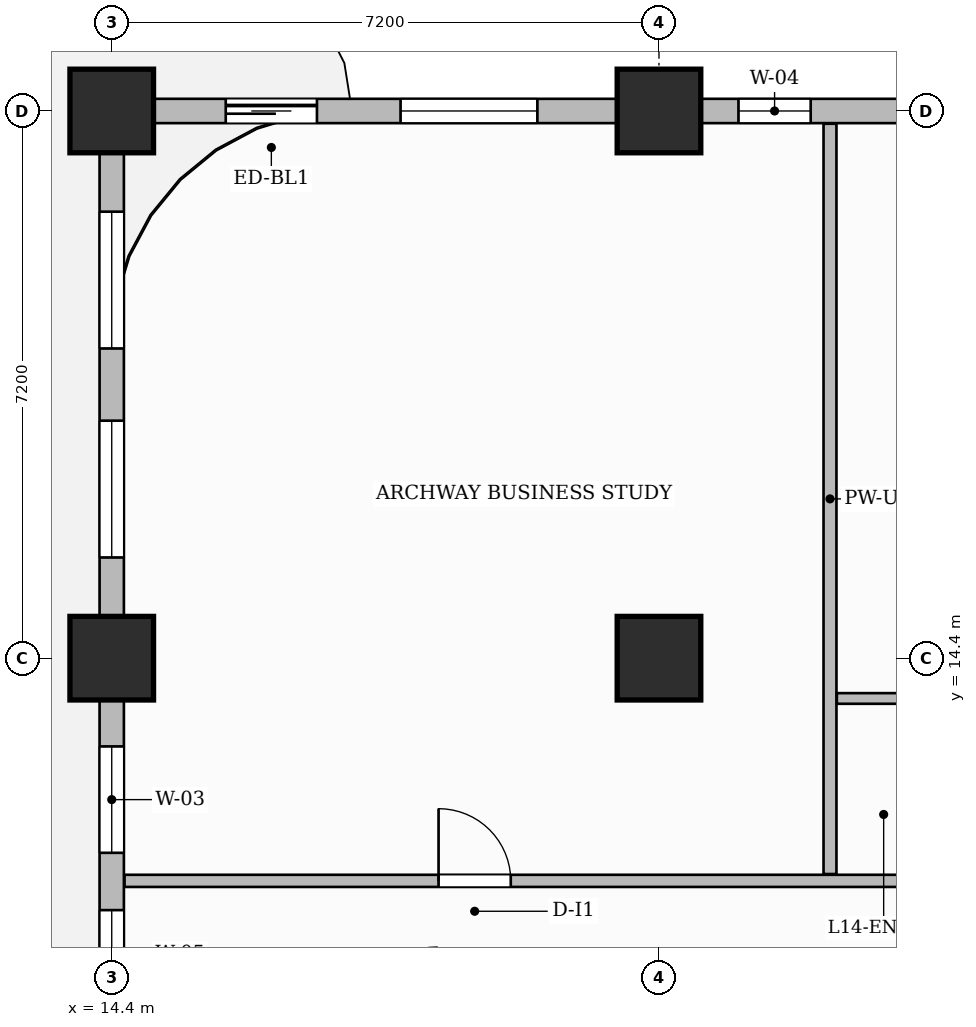
"""IFC4 building model, lengths in metres.
Left out: names, types, materials, properties, quantities, classifications, styles, units other than length and angle.
Written with IfcOpenShell. Run it as: python <this file> out.ifc"""

import sys

from ifc_helpers import new_model, si_unit, direction, frame, frame_2d, origin, origin_2d, place, context, subcontext, project, spatial, rectangle, extrude, source, transform, mapped, element, fill, save


model = new_model("IFC4")
c1 = context("Model", 3, precision=1e-05, world=origin(), true_north=direction((0.0, 1.0)))
c2 = subcontext(c1, "Body", "Model", "MODEL_VIEW")
j1 = project(units=[si_unit("LENGTHUNIT", "METRE"), si_unit("PLANEANGLEUNIT", "RADIAN")], contexts=[c1])
p1 = place(None, origin())
s1 = spatial("IfcSite", under=j1, at=p1, CompositionType="ELEMENT")
p2 = place(p1, origin())
s2 = spatial("IfcBuilding", under=s1, at=p2, CompositionType="ELEMENT")
p3 = place(p2, frame((0.0, 0.0, 62.0)))
s3 = spatial("IfcBuildingStorey", under=s2, at=p3, CompositionType="ELEMENT", Elevation=62.0)
m1 = source(origin(), c2, "Body", "SweptSolid", [
    extrude(rectangle(XDim=1.1, YDim=1.1, at=origin_2d()), origin(), (0.0, 0.0, 1.0), 3.7),
])
for number, where, z_axis, x_axis in (
    (1, (14.4, 14.4, 0.0), (0.0, 0.0, 1.0), (1.0, 0.0, 0.0)),
    (2, (14.4, 21.6, 0.0), (0.0, 0.0, 1.0), (1.0, 0.0, 0.0)),
    (3, (21.6, 14.4, 0.0), (0.0, 0.0, 1.0), (1.0, 0.0, 0.0)),
    (4, (21.6, 21.6, 0.0), (0.0, 0.0, 1.0), (1.0, 0.0, 0.0)),
):
    element("IfcColumn", number, at=place(p3, frame(where, z_axis=z_axis, x_axis=x_axis)), inside=s3, PredefinedType="COLUMN", context=c2, shape_type="MappedRepresentation", body=[
        mapped(m1, transform((0.0, 0.0, 0.0), scale=1.0)),
    ])
p4 = place(p3, frame((14.568, 11.47, 0.0), z_axis=(0.0, 0.0, 1.0), x_axis=(1.0, 0.0, 0.0)))
e5 = element("IfcWall", 5, at=p4, inside=s3, PredefinedType="PARTITIONING", context=c2, shape_type="SweptSolid", body=[
    extrude(rectangle(XDim=15.542, YDim=0.16, at=frame_2d((7.771, 0.0))), origin(), (0.0, 0.0, 1.0), 3.45),
])
p5 = place(p4, frame((4.132, 0.0, 0.0)))
e6 = element("IfcOpeningElement", 6, at=p5, cuts=e5, PredefinedType="OPENING", context=c2, shape_type="SweptSolid", body=[
    extrude(rectangle(XDim=0.95, YDim=2.15, at=frame_2d((0.475, 1.075))), frame((0.0, 0.09, 0.0), z_axis=(0.0, -1.0, 0.0), x_axis=(1.0, 0.0, 0.0)), (0.0, 0.0, 1.0), 0.18),
])
p6 = place(p4, frame((13.107, 0.0, 0.0)))
e7 = element("IfcOpeningElement", 7, at=p6, cuts=e5, PredefinedType="OPENING", context=c2, shape_type="SweptSolid", body=[
    extrude(rectangle(XDim=1.0, YDim=2.2, at=frame_2d((0.5, 1.1))), frame((0.0, 0.09, 0.0), z_axis=(0.0, -1.0, 0.0), x_axis=(1.0, 0.0, 0.0)), (0.0, 0.0, 1.0), 0.18),
])
p7 = place(p3, frame((23.85, 11.56, 0.0), z_axis=(0.0, 0.0, 1.0), x_axis=(0.0, 1.0, 0.0)))
e8 = element("IfcWall", 8, at=p7, inside=s3, PredefinedType="PARTITIONING", context=c2, shape_type="SweptSolid", body=[
    extrude(rectangle(XDim=9.872, YDim=0.17, at=frame_2d((4.936, 0.0))), origin(), (0.0, 0.0, 1.0), 3.45),
])
p8 = place(p3, frame((23.94, 13.87, 0.0), z_axis=(0.0, 0.0, 1.0), x_axis=(1.0, 0.0, 0.0)))
e9 = element("IfcWall", 9, at=p8, inside=s3, PredefinedType="PARTITIONING", context=c2, shape_type="SweptSolid", body=[
    extrude(rectangle(XDim=2.12, YDim=0.14, at=frame_2d((1.06, 0.0))), origin(), (0.0, 0.0, 1.0), 3.45),
])
p9 = place(p3, frame((14.4, 21.6, 0.0), z_axis=(0.0, 0.0, 1.0), x_axis=(1.0, 0.0, 0.0)))
e10 = element("IfcWall", 10, at=p9, inside=s3, PredefinedType="SOLIDWALL", context=c2, shape_type="SweptSolid", body=[
    extrude(rectangle(XDim=43.2, YDim=0.32, at=frame_2d((21.6, 0.0))), origin(), (0.0, 0.0, 1.0), 2.885),
])
p10 = place(p9, frame((1.5, 0.0, 0.0)))
e11 = element("IfcOpeningElement", 11, at=p10, cuts=e10, PredefinedType="OPENING", context=c2, shape_type="SweptSolid", body=[
    extrude(rectangle(XDim=1.2, YDim=2.2, at=frame_2d((0.6, 1.1))), frame((0.0, 0.17, 0.0), z_axis=(0.0, -1.0, 0.0), x_axis=(1.0, 0.0, 0.0)), (0.0, 0.0, 1.0), 0.34),
])
p11 = place(p9, frame((3.8, 0.0, 0.8)))
e12 = element("IfcOpeningElement", 12, at=p11, cuts=e10, PredefinedType="OPENING", context=c2, shape_type="SweptSolid", body=[
    extrude(rectangle(XDim=1.8, YDim=1.85, at=frame_2d((0.9, 0.925))), frame((0.0, 0.17, 0.0), z_axis=(0.0, -1.0, 0.0), x_axis=(1.0, 0.0, 0.0)), (0.0, 0.0, 1.0), 0.34),
])
p12 = place(p9, frame((8.246, 0.0, 0.8)))
e13 = element("IfcOpeningElement", 13, at=p12, cuts=e10, PredefinedType="OPENING", context=c2, shape_type="SweptSolid", body=[
    extrude(rectangle(XDim=0.95, YDim=1.75, at=frame_2d((0.475, 0.875))), frame((0.0, 0.17, 0.0), z_axis=(0.0, -1.0, 0.0), x_axis=(1.0, 0.0, 0.0)), (0.0, 0.0, 1.0), 0.34),
])
p13 = place(p9, frame((10.629, 0.0, 0.8)))
e14 = element("IfcOpeningElement", 14, at=p13, cuts=e10, PredefinedType="OPENING", context=c2, shape_type="SweptSolid", body=[
    extrude(rectangle(XDim=1.8, YDim=1.85, at=frame_2d((0.9, 0.925))), frame((0.0, 0.17, 0.0), z_axis=(0.0, -1.0, 0.0), x_axis=(1.0, 0.0, 0.0)), (0.0, 0.0, 1.0), 0.34),
])
p14 = place(p9, frame((16.701, 0.0, 0.8)))
e15 = element("IfcOpeningElement", 15, at=p14, cuts=e10, PredefinedType="OPENING", context=c2, shape_type="SweptSolid", body=[
    extrude(rectangle(XDim=1.8, YDim=1.85, at=frame_2d((0.9, 0.925))), frame((0.0, 0.17, 0.0), z_axis=(0.0, -1.0, 0.0), x_axis=(1.0, 0.0, 0.0)), (0.0, 0.0, 1.0), 0.34),
])
p15 = place(p9, frame((21.725, 0.0, 0.8)))
e16 = element("IfcOpeningElement", 16, at=p15, cuts=e10, PredefinedType="OPENING", context=c2, shape_type="SweptSolid", body=[
    extrude(rectangle(XDim=1.8, YDim=1.85, at=frame_2d((0.9, 0.925))), frame((0.0, 0.17, 0.0), z_axis=(0.0, -1.0, 0.0), x_axis=(1.0, 0.0, 0.0)), (0.0, 0.0, 1.0), 0.34),
])
p16 = place(p9, frame((24.475, 0.0, 0.8)))
e17 = element("IfcOpeningElement", 17, at=p16, cuts=e10, PredefinedType="OPENING", context=c2, shape_type="SweptSolid", body=[
    extrude(rectangle(XDim=1.8, YDim=1.85, at=frame_2d((0.9, 0.925))), frame((0.0, 0.17, 0.0), z_axis=(0.0, -1.0, 0.0), x_axis=(1.0, 0.0, 0.0)), (0.0, 0.0, 1.0), 0.34),
])
p17 = place(p9, frame((29.075, 0.0, 0.8)))
e18 = element("IfcOpeningElement", 18, at=p17, cuts=e10, PredefinedType="OPENING", context=c2, shape_type="SweptSolid", body=[
    extrude(rectangle(XDim=1.8, YDim=1.85, at=frame_2d((0.9, 0.925))), frame((0.0, 0.17, 0.0), z_axis=(0.0, -1.0, 0.0), x_axis=(1.0, 0.0, 0.0)), (0.0, 0.0, 1.0), 0.34),
])
p18 = place(p9, frame((32.125, 0.0, 0.8)))
e19 = element("IfcOpeningElement", 19, at=p18, cuts=e10, PredefinedType="OPENING", context=c2, shape_type="SweptSolid", body=[
    extrude(rectangle(XDim=1.8, YDim=1.85, at=frame_2d((0.9, 0.925))), frame((0.0, 0.17, 0.0), z_axis=(0.0, -1.0, 0.0), x_axis=(1.0, 0.0, 0.0)), (0.0, 0.0, 1.0), 0.34),
])
p19 = place(p9, frame((36.875, 0.0, 0.8)))
e20 = element("IfcOpeningElement", 20, at=p19, cuts=e10, PredefinedType="OPENING", context=c2, shape_type="SweptSolid", body=[
    extrude(rectangle(XDim=1.8, YDim=1.85, at=frame_2d((0.9, 0.925))), frame((0.0, 0.17, 0.0), z_axis=(0.0, -1.0, 0.0), x_axis=(1.0, 0.0, 0.0)), (0.0, 0.0, 1.0), 0.34),
])
p20 = place(p9, frame((39.925, 0.0, 0.8)))
e21 = element("IfcOpeningElement", 21, at=p20, cuts=e10, PredefinedType="OPENING", context=c2, shape_type="SweptSolid", body=[
    extrude(rectangle(XDim=1.8, YDim=1.85, at=frame_2d((0.9, 0.925))), frame((0.0, 0.17, 0.0), z_axis=(0.0, -1.0, 0.0), x_axis=(1.0, 0.0, 0.0)), (0.0, 0.0, 1.0), 0.34),
])
p21 = place(p3, frame((14.4, 0.05, 0.0), z_axis=(0.0, 0.0, 1.0), x_axis=(0.0, 1.0, 0.0)))
e22 = element("IfcWall", 22, at=p21, inside=s3, PredefinedType="SOLIDWALL", context=c2, shape_type="SweptSolid", body=[
    extrude(rectangle(XDim=21.5, YDim=0.32, at=frame_2d((10.75, 0.0))), origin(), (0.0, 0.0, 1.0), 2.885),
])
p22 = place(p21, frame((1.721, 0.0, 0.8)))
e23 = element("IfcOpeningElement", 23, at=p22, cuts=e22, PredefinedType="OPENING", context=c2, shape_type="SweptSolid", body=[
    extrude(rectangle(XDim=1.8, YDim=1.85, at=frame_2d((0.9, 0.925))), frame((0.0, 0.17, 0.0), z_axis=(0.0, -1.0, 0.0), x_axis=(1.0, 0.0, 0.0)), (0.0, 0.0, 1.0), 0.34),
])
p23 = place(p21, frame((4.854, 0.0, 0.8)))
e24 = element("IfcOpeningElement", 24, at=p23, cuts=e22, PredefinedType="OPENING", context=c2, shape_type="SweptSolid", body=[
    extrude(rectangle(XDim=1.15, YDim=1.8, at=frame_2d((0.575, 0.9))), frame((0.0, 0.17, 0.0), z_axis=(0.0, -1.0, 0.0), x_axis=(1.0, 0.0, 0.0)), (0.0, 0.0, 1.0), 0.34),
])
p24 = place(p21, frame((8.246, 0.0, 0.8)))
e25 = element("IfcOpeningElement", 25, at=p24, cuts=e22, PredefinedType="OPENING", context=c2, shape_type="SweptSolid", body=[
    extrude(rectangle(XDim=0.95, YDim=1.75, at=frame_2d((0.475, 0.875))), frame((0.0, 0.17, 0.0), z_axis=(0.0, -1.0, 0.0), x_axis=(1.0, 0.0, 0.0)), (0.0, 0.0, 1.0), 0.34),
])
p25 = place(p21, frame((9.885, 0.0, 0.8)))
e26 = element("IfcOpeningElement", 26, at=p25, cuts=e22, PredefinedType="OPENING", context=c2, shape_type="SweptSolid", body=[
    extrude(rectangle(XDim=1.15, YDim=1.8, at=frame_2d((0.575, 0.9))), frame((0.0, 0.17, 0.0), z_axis=(0.0, -1.0, 0.0), x_axis=(1.0, 0.0, 0.0)), (0.0, 0.0, 1.0), 0.34),
])
p26 = place(p21, frame((11.789, 0.0, 0.8)))
e27 = element("IfcOpeningElement", 27, at=p26, cuts=e22, PredefinedType="OPENING", context=c2, shape_type="SweptSolid", body=[
    extrude(rectangle(XDim=1.4, YDim=1.85, at=frame_2d((0.7, 0.925))), frame((0.0, 0.17, 0.0), z_axis=(0.0, -1.0, 0.0), x_axis=(1.0, 0.0, 0.0)), (0.0, 0.0, 1.0), 0.34),
])
p27 = place(p21, frame((15.675, 0.0, 0.8)))
e28 = element("IfcOpeningElement", 28, at=p27, cuts=e22, PredefinedType="OPENING", context=c2, shape_type="SweptSolid", body=[
    extrude(rectangle(XDim=1.8, YDim=1.85, at=frame_2d((0.9, 0.925))), frame((0.0, 0.17, 0.0), z_axis=(0.0, -1.0, 0.0), x_axis=(1.0, 0.0, 0.0)), (0.0, 0.0, 1.0), 0.34),
])
p28 = place(p21, frame((18.425, 0.0, 0.8)))
e29 = element("IfcOpeningElement", 29, at=p28, cuts=e22, PredefinedType="OPENING", context=c2, shape_type="SweptSolid", body=[
    extrude(rectangle(XDim=1.8, YDim=1.85, at=frame_2d((0.9, 0.925))), frame((0.0, 0.17, 0.0), z_axis=(0.0, -1.0, 0.0), x_axis=(1.0, 0.0, 0.0)), (0.0, 0.0, 1.0), 0.34),
])
m2 = source(origin(), c2, "Body", "SweptSolid", [
    extrude(rectangle(XDim=0.95, YDim=2.15, at=frame_2d((0.475, 1.075))), frame((0.0, 0.025, 0.0), z_axis=(0.0, -1.0, 0.0), x_axis=(1.0, 0.0, 0.0)), (0.0, 0.0, 1.0), 0.05),
])
p29 = place(p5, origin())
e30 = element("IfcDoor", 30, at=p29, inside=s3, OperationType="SINGLE_SWING_LEFT", PredefinedType="DOOR", context=c2, shape_type="MappedRepresentation", body=[
    mapped(m2, transform((0.0, 0.0, 0.0), scale=1.0)),
])
fill(e6, e30)
m3 = source(origin(), c2, "Body", "SweptSolid", [
    extrude(rectangle(XDim=1.2, YDim=2.2, at=frame_2d((0.6, 1.1))), frame((0.0, 0.025, 0.0), z_axis=(0.0, -1.0, 0.0), x_axis=(1.0, 0.0, 0.0)), (0.0, 0.0, 1.0), 0.05),
])
p30 = place(p10, origin())
e31 = element("IfcDoor", 31, at=p30, inside=s3, OperationType="SLIDING_TO_LEFT", PredefinedType="DOOR", context=c2, shape_type="MappedRepresentation", body=[
    mapped(m3, transform((0.0, 0.0, 0.0), scale=1.0)),
])
fill(e11, e31)
m4 = source(origin(), c2, "Body", "SweptSolid", [
    extrude(rectangle(XDim=1.8, YDim=1.85, at=frame_2d((0.9, 0.925))), frame((0.0, 0.03, 0.0), z_axis=(0.0, -1.0, 0.0), x_axis=(1.0, 0.0, 0.0)), (0.0, 0.0, 1.0), 0.06),
])
p31 = place(p11, origin())
e32 = element("IfcWindow", 32, at=p31, inside=s3, PartitioningType="DOUBLE_PANEL_VERTICAL", PredefinedType="WINDOW", context=c2, shape_type="MappedRepresentation", body=[
    mapped(m4, transform((0.0, 0.0, 0.0), scale=1.0)),
])
fill(e12, e32)
m5 = source(origin(), c2, "Body", "SweptSolid", [
    extrude(rectangle(XDim=0.95, YDim=1.75, at=frame_2d((0.475, 0.875))), frame((0.0, 0.03, 0.0), z_axis=(0.0, -1.0, 0.0), x_axis=(1.0, 0.0, 0.0)), (0.0, 0.0, 1.0), 0.06),
])
p32 = place(p12, origin())
e33 = element("IfcWindow", 33, at=p32, inside=s3, PartitioningType="SINGLE_PANEL", PredefinedType="WINDOW", context=c2, shape_type="MappedRepresentation", body=[
    mapped(m5, transform((0.0, 0.0, 0.0), scale=1.0)),
])
fill(e13, e33)
m6 = source(origin(), c2, "Body", "SweptSolid", [
    extrude(rectangle(XDim=1.15, YDim=1.8, at=frame_2d((0.575, 0.9))), frame((0.0, 0.03, 0.0), z_axis=(0.0, -1.0, 0.0), x_axis=(1.0, 0.0, 0.0)), (0.0, 0.0, 1.0), 0.06),
])
p33 = place(p25, origin())
e34 = element("IfcWindow", 34, at=p33, inside=s3, PartitioningType="SINGLE_PANEL", PredefinedType="WINDOW", context=c2, shape_type="MappedRepresentation", body=[
    mapped(m6, transform((0.0, 0.0, 0.0), scale=1.0)),
])
fill(e26, e34)
m7 = source(origin(), c2, "Body", "SweptSolid", [
    extrude(rectangle(XDim=1.4, YDim=1.85, at=frame_2d((0.7, 0.925))), frame((0.0, 0.03, 0.0), z_axis=(0.0, -1.0, 0.0), x_axis=(1.0, 0.0, 0.0)), (0.0, 0.0, 1.0), 0.06),
])
p34 = place(p26, origin())
e35 = element("IfcWindow", 35, at=p34, inside=s3, PartitioningType="SINGLE_PANEL", PredefinedType="WINDOW", context=c2, shape_type="MappedRepresentation", body=[
    mapped(m7, transform((0.0, 0.0, 0.0), scale=1.0)),
])
fill(e27, e35)
p35 = place(p27, origin())
e36 = element("IfcWindow", 36, at=p35, inside=s3, PartitioningType="DOUBLE_PANEL_VERTICAL", PredefinedType="WINDOW", context=c2, shape_type="MappedRepresentation", body=[
    mapped(m4, transform((0.0, 0.0, 0.0), scale=1.0)),
])
fill(e28, e36)
p36 = place(p28, origin())
e37 = element("IfcWindow", 37, at=p36, inside=s3, PartitioningType="DOUBLE_PANEL_VERTICAL", PredefinedType="WINDOW", context=c2, shape_type="MappedRepresentation", body=[
    mapped(m4, transform((0.0, 0.0, 0.0), scale=1.0)),
])
fill(e29, e37)
save(model, sys.argv[1])
